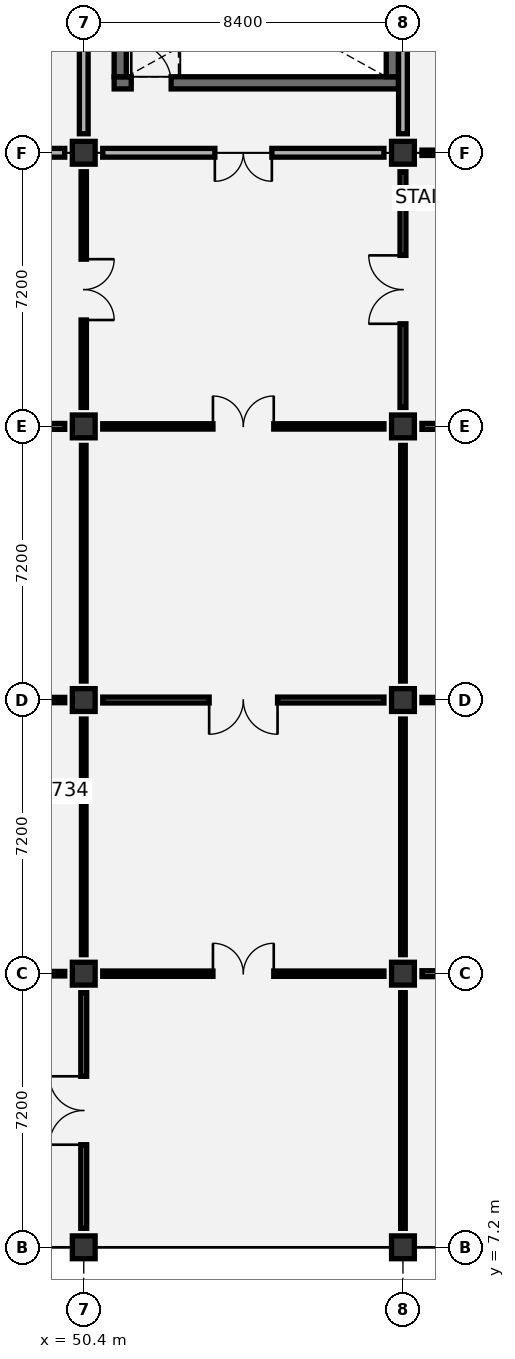
"""IFC4 building model, lengths in metres.
Left out: names, types, materials, properties, quantities, classifications, styles, units other than length and angle.
Written with IfcOpenShell. Run it as: python <this file> out.ifc"""

import sys

from ifc_helpers import new_model, si_unit, direction, frame, frame_2d, origin, origin_2d, place, context, subcontext, project, spatial, rectangle, extrude, element, fill, save


model = new_model("IFC4")
c1 = context("Model", 3, precision=1e-05, world=origin(), true_north=direction((0.0, 1.0)))
c2 = subcontext(c1, "Body", "Model", "MODEL_VIEW")
j1 = project(units=[si_unit("LENGTHUNIT", "METRE"), si_unit("PLANEANGLEUNIT", "RADIAN")], contexts=[c1])
p1 = place(None, origin())
s1 = spatial("IfcSite", under=j1, at=p1, CompositionType="ELEMENT")
p2 = place(p1, origin())
s2 = spatial("IfcBuilding", under=s1, at=p2, CompositionType="ELEMENT")
p3 = place(p2, frame((0.0, 0.0, 16.8)))
s3 = spatial("IfcBuildingStorey", under=s2, at=p3, CompositionType="ELEMENT", Elevation=16.8)
for number, where, z_axis, x_axis in (
    (1, (50.4, 7.2, 0.0), (0.0, 0.0, 1.0), (1.0, 0.0, 0.0)),
    (2, (50.4, 14.4, 0.0), (0.0, 0.0, 1.0), (1.0, 0.0, 0.0)),
    (3, (50.4, 21.6, 0.0), (0.0, 0.0, 1.0), (1.0, 0.0, 0.0)),
    (4, (50.4, 28.8, 0.0), (0.0, 0.0, 1.0), (1.0, 0.0, 0.0)),
    (5, (50.4, 36.0, 0.0), (0.0, 0.0, 1.0), (1.0, 0.0, 0.0)),
    (6, (58.8, 7.2, 0.0), (0.0, 0.0, 1.0), (1.0, 0.0, 0.0)),
    (7, (58.8, 14.4, 0.0), (0.0, 0.0, 1.0), (1.0, 0.0, 0.0)),
    (8, (58.8, 21.6, 0.0), (0.0, 0.0, 1.0), (1.0, 0.0, 0.0)),
    (9, (58.8, 28.8, 0.0), (0.0, 0.0, 1.0), (1.0, 0.0, 0.0)),
    (10, (58.8, 36.0, 0.0), (0.0, 0.0, 1.0), (1.0, 0.0, 0.0)),
):
    element("IfcColumn", number, at=place(p3, frame(where, z_axis=z_axis, x_axis=x_axis)), inside=s3, PredefinedType="COLUMN", context=c2, shape_type="SweptSolid", body=[
        extrude(rectangle(XDim=0.6, YDim=0.6, at=origin_2d()), origin(), (0.0, 0.0, 1.0), 5.05),
    ])
p4 = place(p3, frame((51.2, 37.84, 0.0), z_axis=(0.0, 0.0, 1.0), x_axis=(1.0, 0.0, 0.0)))
e11 = element("IfcWall", 11, at=p4, inside=s3, PredefinedType="SHEAR", context=c2, shape_type="SweptSolid", body=[
    extrude(rectangle(XDim=7.48, YDim=0.32, at=frame_2d((3.74, 0.0))), origin(), (0.0, 0.0, 1.0), 4.825),
])
p5 = place(p4, frame((0.45, 0.0, 0.0)))
e12 = element("IfcOpeningElement", 12, at=p5, cuts=e11, PredefinedType="OPENING", context=c2, shape_type="SweptSolid", body=[
    extrude(rectangle(XDim=1.05, YDim=2.15, at=frame_2d((0.525, 1.075))), frame((0.0, 0.17, 0.0), z_axis=(0.0, -1.0, 0.0), x_axis=(1.0, 0.0, 0.0)), (0.0, 0.0, 1.0), 0.34),
])
for number, where, z_axis, x_axis in (
    (13, (51.36, 38.0, 0.0), (0.0, 0.0, 1.0), (0.0, 1.0, 0.0)),
    (14, (58.52, 38.0, 0.0), (0.0, 0.0, 1.0), (0.0, 1.0, 0.0)),
):
    element("IfcWall", number, at=place(p3, frame(where, z_axis=z_axis, x_axis=x_axis)), inside=s3, PredefinedType="SHEAR", context=c2, shape_type="SweptSolid", body=[
        extrude(rectangle(XDim=3.8, YDim=0.32, at=frame_2d((1.9, 0.0))), origin(), (0.0, 0.0, 1.0), 4.825),
    ])
p6 = place(p3, frame((42.15, 19.2, 0.0), z_axis=(0.0, 0.0, 1.0), x_axis=(1.0, 0.0, 0.0)))
e15 = element("IfcWall", 15, at=p6, inside=s3, PredefinedType="PARTITIONING", context=c2, shape_type="SweptSolid", body=[
    extrude(rectangle(XDim=8.1, YDim=0.12, at=frame_2d((4.05, 0.0))), origin(), (0.0, 0.0, 1.0), 4.825),
])
p7 = place(p6, frame((1.08, 0.0, 0.0)))
e16 = element("IfcOpeningElement", 16, at=p7, cuts=e15, PredefinedType="OPENING", context=c2, shape_type="SweptSolid", body=[
    extrude(rectangle(XDim=0.95, YDim=2.1, at=frame_2d((0.475, 1.05))), frame((0.0, 0.07, 0.0), z_axis=(0.0, -1.0, 0.0), x_axis=(1.0, 0.0, 0.0)), (0.0, 0.0, 1.0), 0.14),
])
p8 = place(p6, frame((3.63, 0.0, 0.0)))
e17 = element("IfcOpeningElement", 17, at=p8, cuts=e15, PredefinedType="OPENING", context=c2, shape_type="SweptSolid", body=[
    extrude(rectangle(XDim=0.9, YDim=2.1, at=frame_2d((0.45, 1.05))), frame((0.0, 0.07, 0.0), z_axis=(0.0, -1.0, 0.0), x_axis=(1.0, 0.0, 0.0)), (0.0, 0.0, 1.0), 0.14),
])
p9 = place(p6, frame((6.13, 0.0, 0.0)))
e18 = element("IfcOpeningElement", 18, at=p9, cuts=e15, PredefinedType="OPENING", context=c2, shape_type="SweptSolid", body=[
    extrude(rectangle(XDim=1.0, YDim=2.1, at=frame_2d((0.5, 1.05))), frame((0.0, 0.07, 0.0), z_axis=(0.0, -1.0, 0.0), x_axis=(1.0, 0.0, 0.0)), (0.0, 0.0, 1.0), 0.14),
])
p10 = place(p3, frame((50.4, 7.7, 0.0), z_axis=(0.0, 0.0, 1.0), x_axis=(0.0, 1.0, 0.0)))
e19 = element("IfcWall", 19, at=p10, inside=s3, PredefinedType="PARTITIONING", context=c2, shape_type="SweptSolid", body=[
    extrude(rectangle(XDim=6.2, YDim=0.155, at=frame_2d((3.1, 0.0))), origin(), (0.0, 0.0, 1.0), 4.32),
])
p11 = place(p10, frame((2.2, 0.0, 0.0)))
e20 = element("IfcOpeningElement", 20, at=p11, cuts=e19, PredefinedType="OPENING", context=c2, shape_type="SweptSolid", body=[
    extrude(rectangle(XDim=1.8, YDim=2.25, at=frame_2d((0.9, 1.125))), frame((0.0, 0.087, 0.0), z_axis=(0.0, -1.0, 0.0), x_axis=(1.0, 0.0, 0.0)), (0.0, 0.0, 1.0), 0.175),
])
p12 = place(p3, frame((42.5, 14.4, 0.0), z_axis=(0.0, 0.0, 1.0), x_axis=(1.0, 0.0, 0.0)))
e21 = element("IfcWall", 21, at=p12, inside=s3, PredefinedType="PARTITIONING", context=c2, shape_type="SweptSolid", body=[
    extrude(rectangle(XDim=7.4, YDim=0.12, at=frame_2d((3.7, 0.0))), origin(), (0.0, 0.0, 1.0), 4.07),
])
p13 = place(p3, frame((50.4, 14.9, 0.0), z_axis=(0.0, 0.0, 1.0), x_axis=(0.0, 1.0, 0.0)))
e22 = element("IfcWall", 22, at=p13, inside=s3, PredefinedType="PARTITIONING", context=c2, shape_type="SweptSolid", body=[
    extrude(rectangle(XDim=6.2, YDim=0.12, at=frame_2d((3.1, 0.0))), origin(), (0.0, 0.0, 1.0), 4.12),
])
p14 = place(p3, frame((42.5, 21.6, 0.0), z_axis=(0.0, 0.0, 1.0), x_axis=(1.0, 0.0, 0.0)))
e23 = element("IfcWall", 23, at=p14, inside=s3, PredefinedType="PARTITIONING", context=c2, shape_type="SweptSolid", body=[
    extrude(rectangle(XDim=7.4, YDim=0.14, at=frame_2d((3.7, 0.0))), origin(), (0.0, 0.0, 1.0), 4.07),
])
p15 = place(p14, frame((2.9, 0.0, 0.0)))
e24 = element("IfcOpeningElement", 24, at=p15, cuts=e23, PredefinedType="OPENING", context=c2, shape_type="SweptSolid", body=[
    extrude(rectangle(XDim=1.6, YDim=2.2, at=frame_2d((0.8, 1.1))), frame((0.0, 0.08, 0.0), z_axis=(0.0, -1.0, 0.0), x_axis=(1.0, 0.0, 0.0)), (0.0, 0.0, 1.0), 0.16),
])
p16 = place(p3, frame((50.4, 22.1, 0.0), z_axis=(0.0, 0.0, 1.0), x_axis=(0.0, 1.0, 0.0)))
e25 = element("IfcWall", 25, at=p16, inside=s3, PredefinedType="PARTITIONING", context=c2, shape_type="SweptSolid", body=[
    extrude(rectangle(XDim=6.2, YDim=0.12, at=frame_2d((3.1, 0.0))), origin(), (0.0, 0.0, 1.0), 4.42),
])
p17 = place(p3, frame((42.5, 28.8, 0.0), z_axis=(0.0, 0.0, 1.0), x_axis=(1.0, 0.0, 0.0)))
e26 = element("IfcWall", 26, at=p17, inside=s3, PredefinedType="PARTITIONING", context=c2, shape_type="SweptSolid", body=[
    extrude(rectangle(XDim=7.4, YDim=0.155, at=frame_2d((3.7, 0.0))), origin(), (0.0, 0.0, 1.0), 4.07),
])
p18 = place(p17, frame((2.8, 0.0, 0.0)))
e27 = element("IfcOpeningElement", 27, at=p18, cuts=e26, PredefinedType="OPENING", context=c2, shape_type="SweptSolid", body=[
    extrude(rectangle(XDim=1.8, YDim=2.25, at=frame_2d((0.9, 1.125))), frame((0.0, 0.087, 0.0), z_axis=(0.0, -1.0, 0.0), x_axis=(1.0, 0.0, 0.0)), (0.0, 0.0, 1.0), 0.175),
])
p19 = place(p3, frame((50.4, 29.3, 0.0), z_axis=(0.0, 0.0, 1.0), x_axis=(0.0, 1.0, 0.0)))
e28 = element("IfcWall", 28, at=p19, inside=s3, PredefinedType="PARTITIONING", context=c2, shape_type="SweptSolid", body=[
    extrude(rectangle(XDim=6.2, YDim=0.14, at=frame_2d((3.1, 0.0))), origin(), (0.0, 0.0, 1.0), 4.12),
])
p20 = place(p19, frame((2.3, 0.0, 0.0)))
e29 = element("IfcOpeningElement", 29, at=p20, cuts=e28, PredefinedType="OPENING", context=c2, shape_type="SweptSolid", body=[
    extrude(rectangle(XDim=1.6, YDim=2.2, at=frame_2d((0.8, 1.1))), frame((0.0, 0.08, 0.0), z_axis=(0.0, -1.0, 0.0), x_axis=(1.0, 0.0, 0.0)), (0.0, 0.0, 1.0), 0.16),
])
p21 = place(p3, frame((42.5, 36.0, 0.0), z_axis=(0.0, 0.0, 1.0), x_axis=(1.0, 0.0, 0.0)))
e30 = element("IfcWall", 30, at=p21, inside=s3, PredefinedType="PARTITIONING", context=c2, shape_type="SweptSolid", body=[
    extrude(rectangle(XDim=7.4, YDim=0.23, at=frame_2d((3.7, 0.0))), origin(), (0.0, 0.0, 1.0), 4.07),
])
p22 = place(p21, frame((2.95, 0.0, 0.0)))
e31 = element("IfcOpeningElement", 31, at=p22, cuts=e30, PredefinedType="OPENING", context=c2, shape_type="SweptSolid", body=[
    extrude(rectangle(XDim=1.5, YDim=2.15, at=frame_2d((0.75, 1.075))), frame((0.0, 0.125, 0.0), z_axis=(0.0, -1.0, 0.0), x_axis=(1.0, 0.0, 0.0)), (0.0, 0.0, 1.0), 0.25),
])
p23 = place(p3, frame((50.4, 36.5, 0.0), z_axis=(0.0, 0.0, 1.0), x_axis=(0.0, 1.0, 0.0)))
e32 = element("IfcWall", 32, at=p23, inside=s3, PredefinedType="PARTITIONING", context=c2, shape_type="SweptSolid", body=[
    extrude(rectangle(XDim=6.2, YDim=0.23, at=frame_2d((3.1, 0.0))), origin(), (0.0, 0.0, 1.0), 4.53),
])
p24 = place(p3, frame((58.8, 7.7, 0.0), z_axis=(0.0, 0.0, 1.0), x_axis=(0.0, 1.0, 0.0)))
e33 = element("IfcWall", 33, at=p24, inside=s3, PredefinedType="PARTITIONING", context=c2, shape_type="SweptSolid", body=[
    extrude(rectangle(XDim=6.2, YDim=0.12, at=frame_2d((3.1, 0.0))), origin(), (0.0, 0.0, 1.0), 4.12),
])
p25 = place(p3, frame((50.9, 14.4, 0.0), z_axis=(0.0, 0.0, 1.0), x_axis=(1.0, 0.0, 0.0)))
e34 = element("IfcWall", 34, at=p25, inside=s3, PredefinedType="PARTITIONING", context=c2, shape_type="SweptSolid", body=[
    extrude(rectangle(XDim=7.4, YDim=0.14, at=frame_2d((3.7, 0.0))), origin(), (0.0, 0.0, 1.0), 4.07),
])
p26 = place(p25, frame((2.9, 0.0, 0.0)))
e35 = element("IfcOpeningElement", 35, at=p26, cuts=e34, PredefinedType="OPENING", context=c2, shape_type="SweptSolid", body=[
    extrude(rectangle(XDim=1.6, YDim=2.2, at=frame_2d((0.8, 1.1))), frame((0.0, 0.08, 0.0), z_axis=(0.0, -1.0, 0.0), x_axis=(1.0, 0.0, 0.0)), (0.0, 0.0, 1.0), 0.16),
])
p27 = place(p3, frame((58.8, 14.9, 0.0), z_axis=(0.0, 0.0, 1.0), x_axis=(0.0, 1.0, 0.0)))
e36 = element("IfcWall", 36, at=p27, inside=s3, PredefinedType="PARTITIONING", context=c2, shape_type="SweptSolid", body=[
    extrude(rectangle(XDim=6.2, YDim=0.12, at=frame_2d((3.1, 0.0))), origin(), (0.0, 0.0, 1.0), 4.42),
])
p28 = place(p3, frame((50.9, 21.6, 0.0), z_axis=(0.0, 0.0, 1.0), x_axis=(1.0, 0.0, 0.0)))
e37 = element("IfcWall", 37, at=p28, inside=s3, PredefinedType="PARTITIONING", context=c2, shape_type="SweptSolid", body=[
    extrude(rectangle(XDim=7.4, YDim=0.155, at=frame_2d((3.7, 0.0))), origin(), (0.0, 0.0, 1.0), 4.07),
])
p29 = place(p28, frame((2.8, 0.0, 0.0)))
e38 = element("IfcOpeningElement", 38, at=p29, cuts=e37, PredefinedType="OPENING", context=c2, shape_type="SweptSolid", body=[
    extrude(rectangle(XDim=1.8, YDim=2.25, at=frame_2d((0.9, 1.125))), frame((0.0, 0.087, 0.0), z_axis=(0.0, -1.0, 0.0), x_axis=(1.0, 0.0, 0.0)), (0.0, 0.0, 1.0), 0.175),
])
p30 = place(p3, frame((58.8, 22.1, 0.0), z_axis=(0.0, 0.0, 1.0), x_axis=(0.0, 1.0, 0.0)))
e39 = element("IfcWall", 39, at=p30, inside=s3, PredefinedType="PARTITIONING", context=c2, shape_type="SweptSolid", body=[
    extrude(rectangle(XDim=6.2, YDim=0.12, at=frame_2d((3.1, 0.0))), origin(), (0.0, 0.0, 1.0), 4.12),
])
p31 = place(p3, frame((50.9, 28.8, 0.0), z_axis=(0.0, 0.0, 1.0), x_axis=(1.0, 0.0, 0.0)))
e40 = element("IfcWall", 40, at=p31, inside=s3, PredefinedType="PARTITIONING", context=c2, shape_type="SweptSolid", body=[
    extrude(rectangle(XDim=7.4, YDim=0.14, at=frame_2d((3.7, 0.0))), origin(), (0.0, 0.0, 1.0), 4.07),
])
p32 = place(p31, frame((2.9, 0.0, 0.0)))
e41 = element("IfcOpeningElement", 41, at=p32, cuts=e40, PredefinedType="OPENING", context=c2, shape_type="SweptSolid", body=[
    extrude(rectangle(XDim=1.6, YDim=2.2, at=frame_2d((0.8, 1.1))), frame((0.0, 0.08, 0.0), z_axis=(0.0, -1.0, 0.0), x_axis=(1.0, 0.0, 0.0)), (0.0, 0.0, 1.0), 0.16),
])
p33 = place(p3, frame((58.8, 29.3, 0.0), z_axis=(0.0, 0.0, 1.0), x_axis=(0.0, 1.0, 0.0)))
e42 = element("IfcWall", 42, at=p33, inside=s3, PredefinedType="PARTITIONING", context=c2, shape_type="SweptSolid", body=[
    extrude(rectangle(XDim=6.2, YDim=0.155, at=frame_2d((3.1, 0.0))), origin(), (0.0, 0.0, 1.0), 4.53),
])
p34 = place(p33, frame((2.2, 0.0, 0.0)))
e43 = element("IfcOpeningElement", 43, at=p34, cuts=e42, PredefinedType="OPENING", context=c2, shape_type="SweptSolid", body=[
    extrude(rectangle(XDim=1.8, YDim=2.25, at=frame_2d((0.9, 1.125))), frame((0.0, 0.087, 0.0), z_axis=(0.0, -1.0, 0.0), x_axis=(1.0, 0.0, 0.0)), (0.0, 0.0, 1.0), 0.175),
])
p35 = place(p3, frame((50.9, 36.0, 0.0), z_axis=(0.0, 0.0, 1.0), x_axis=(1.0, 0.0, 0.0)))
e44 = element("IfcWall", 44, at=p35, inside=s3, PredefinedType="PARTITIONING", context=c2, shape_type="SweptSolid", body=[
    extrude(rectangle(XDim=7.4, YDim=0.23, at=frame_2d((3.7, 0.0))), origin(), (0.0, 0.0, 1.0), 4.07),
])
p36 = place(p35, frame((2.95, 0.0, 0.0)))
e45 = element("IfcOpeningElement", 45, at=p36, cuts=e44, PredefinedType="OPENING", context=c2, shape_type="SweptSolid", body=[
    extrude(rectangle(XDim=1.5, YDim=2.15, at=frame_2d((0.75, 1.075))), frame((0.0, 0.125, 0.0), z_axis=(0.0, -1.0, 0.0), x_axis=(1.0, 0.0, 0.0)), (0.0, 0.0, 1.0), 0.25),
])
p37 = place(p3, frame((58.8, 36.5, 0.0), z_axis=(0.0, 0.0, 1.0), x_axis=(0.0, 1.0, 0.0)))
e46 = element("IfcWall", 46, at=p37, inside=s3, PredefinedType="PARTITIONING", context=c2, shape_type="SweptSolid", body=[
    extrude(rectangle(XDim=6.2, YDim=0.23, at=frame_2d((3.1, 0.0))), origin(), (0.0, 0.0, 1.0), 4.12),
])
p38 = place(p3, frame((59.3, 14.4, 0.0), z_axis=(0.0, 0.0, 1.0), x_axis=(1.0, 0.0, 0.0)))
e47 = element("IfcWall", 47, at=p38, inside=s3, PredefinedType="PARTITIONING", context=c2, shape_type="SweptSolid", body=[
    extrude(rectangle(XDim=7.4, YDim=0.155, at=frame_2d((3.7, 0.0))), origin(), (0.0, 0.0, 1.0), 4.07),
])
p39 = place(p38, frame((2.8, 0.0, 0.0)))
e48 = element("IfcOpeningElement", 48, at=p39, cuts=e47, PredefinedType="OPENING", context=c2, shape_type="SweptSolid", body=[
    extrude(rectangle(XDim=1.8, YDim=2.25, at=frame_2d((0.9, 1.125))), frame((0.0, 0.087, 0.0), z_axis=(0.0, -1.0, 0.0), x_axis=(1.0, 0.0, 0.0)), (0.0, 0.0, 1.0), 0.175),
])
p40 = place(p3, frame((59.3, 21.6, 0.0), z_axis=(0.0, 0.0, 1.0), x_axis=(1.0, 0.0, 0.0)))
e49 = element("IfcWall", 49, at=p40, inside=s3, PredefinedType="PARTITIONING", context=c2, shape_type="SweptSolid", body=[
    extrude(rectangle(XDim=7.4, YDim=0.14, at=frame_2d((3.7, 0.0))), origin(), (0.0, 0.0, 1.0), 4.07),
])
p41 = place(p40, frame((2.9, 0.0, 0.0)))
e50 = element("IfcOpeningElement", 50, at=p41, cuts=e49, PredefinedType="OPENING", context=c2, shape_type="SweptSolid", body=[
    extrude(rectangle(XDim=1.6, YDim=2.2, at=frame_2d((0.8, 1.1))), frame((0.0, 0.08, 0.0), z_axis=(0.0, -1.0, 0.0), x_axis=(1.0, 0.0, 0.0)), (0.0, 0.0, 1.0), 0.16),
])
p42 = place(p3, frame((59.3, 28.8, 0.0), z_axis=(0.0, 0.0, 1.0), x_axis=(1.0, 0.0, 0.0)))
e51 = element("IfcWall", 51, at=p42, inside=s3, PredefinedType="PARTITIONING", context=c2, shape_type="SweptSolid", body=[
    extrude(rectangle(XDim=7.4, YDim=0.155, at=frame_2d((3.7, 0.0))), origin(), (0.0, 0.0, 1.0), 4.07),
])
p43 = place(p42, frame((2.8, 0.0, 0.0)))
e52 = element("IfcOpeningElement", 52, at=p43, cuts=e51, PredefinedType="OPENING", context=c2, shape_type="SweptSolid", body=[
    extrude(rectangle(XDim=1.8, YDim=2.25, at=frame_2d((0.9, 1.125))), frame((0.0, 0.087, 0.0), z_axis=(0.0, -1.0, 0.0), x_axis=(1.0, 0.0, 0.0)), (0.0, 0.0, 1.0), 0.175),
])
p44 = place(p3, frame((59.3, 36.0, 0.0), z_axis=(0.0, 0.0, 1.0), x_axis=(1.0, 0.0, 0.0)))
e53 = element("IfcWall", 53, at=p44, inside=s3, PredefinedType="PARTITIONING", context=c2, shape_type="SweptSolid", body=[
    extrude(rectangle(XDim=7.4, YDim=0.14, at=frame_2d((3.7, 0.0))), origin(), (0.0, 0.0, 1.0), 4.07),
])
p45 = place(p44, frame((2.9, 0.0, 0.0)))
e54 = element("IfcOpeningElement", 54, at=p45, cuts=e53, PredefinedType="OPENING", context=c2, shape_type="SweptSolid", body=[
    extrude(rectangle(XDim=1.6, YDim=2.2, at=frame_2d((0.8, 1.1))), frame((0.0, 0.08, 0.0), z_axis=(0.0, -1.0, 0.0), x_axis=(1.0, 0.0, 0.0)), (0.0, 0.0, 1.0), 0.16),
])
p46 = place(p5, origin())
e55 = element("IfcDoor", 55, at=p46, inside=s3, OperationType="SINGLE_SWING_LEFT", PredefinedType="DOOR", context=c2, shape_type="SweptSolid", body=[
    extrude(rectangle(XDim=1.05, YDim=2.15, at=frame_2d((0.525, 1.075))), frame((0.0, 0.025, 0.0), z_axis=(0.0, -1.0, 0.0), x_axis=(1.0, 0.0, 0.0)), (0.0, 0.0, 1.0), 0.05),
])
fill(e12, e55)
p47 = place(p11, origin())
e56 = element("IfcDoor", 56, at=p47, inside=s3, OperationType="DOUBLE_DOOR_SINGLE_SWING", PredefinedType="DOOR", context=c2, shape_type="SweptSolid", body=[
    extrude(rectangle(XDim=1.8, YDim=2.25, at=frame_2d((0.9, 1.125))), frame((0.0, 0.025, 0.0), z_axis=(0.0, -1.0, 0.0), x_axis=(1.0, 0.0, 0.0)), (0.0, 0.0, 1.0), 0.05),
])
fill(e20, e56)
p48 = place(p20, frame((1.6, 0.0, 0.0), z_axis=(0.0, 0.0, 1.0), x_axis=(-1.0, 0.0, 0.0)))
e57 = element("IfcDoor", 57, at=p48, inside=s3, OperationType="DOUBLE_DOOR_SINGLE_SWING", PredefinedType="DOOR", context=c2, shape_type="SweptSolid", body=[
    extrude(rectangle(XDim=1.6, YDim=2.2, at=frame_2d((0.8, 1.1))), frame((0.0, 0.025, 0.0), z_axis=(0.0, -1.0, 0.0), x_axis=(1.0, 0.0, 0.0)), (0.0, 0.0, 1.0), 0.05),
])
fill(e29, e57)
p49 = place(p26, origin())
e58 = element("IfcDoor", 58, at=p49, inside=s3, OperationType="DOUBLE_DOOR_SINGLE_SWING", PredefinedType="DOOR", context=c2, shape_type="SweptSolid", body=[
    extrude(rectangle(XDim=1.6, YDim=2.2, at=frame_2d((0.8, 1.1))), frame((0.0, 0.025, 0.0), z_axis=(0.0, -1.0, 0.0), x_axis=(1.0, 0.0, 0.0)), (0.0, 0.0, 1.0), 0.05),
])
fill(e35, e58)
p50 = place(p29, frame((1.8, 0.0, 0.0), z_axis=(0.0, 0.0, 1.0), x_axis=(-1.0, 0.0, 0.0)))
e59 = element("IfcDoor", 59, at=p50, inside=s3, OperationType="DOUBLE_DOOR_SINGLE_SWING", PredefinedType="DOOR", context=c2, shape_type="SweptSolid", body=[
    extrude(rectangle(XDim=1.8, YDim=2.25, at=frame_2d((0.9, 1.125))), frame((0.0, 0.025, 0.0), z_axis=(0.0, -1.0, 0.0), x_axis=(1.0, 0.0, 0.0)), (0.0, 0.0, 1.0), 0.05),
])
fill(e38, e59)
p51 = place(p32, origin())
e60 = element("IfcDoor", 60, at=p51, inside=s3, OperationType="DOUBLE_DOOR_SINGLE_SWING", PredefinedType="DOOR", context=c2, shape_type="SweptSolid", body=[
    extrude(rectangle(XDim=1.6, YDim=2.2, at=frame_2d((0.8, 1.1))), frame((0.0, 0.025, 0.0), z_axis=(0.0, -1.0, 0.0), x_axis=(1.0, 0.0, 0.0)), (0.0, 0.0, 1.0), 0.05),
])
fill(e41, e60)
p52 = place(p34, origin())
e61 = element("IfcDoor", 61, at=p52, inside=s3, OperationType="DOUBLE_DOOR_SINGLE_SWING", PredefinedType="DOOR", context=c2, shape_type="SweptSolid", body=[
    extrude(rectangle(XDim=1.8, YDim=2.25, at=frame_2d((0.9, 1.125))), frame((0.0, 0.025, 0.0), z_axis=(0.0, -1.0, 0.0), x_axis=(1.0, 0.0, 0.0)), (0.0, 0.0, 1.0), 0.05),
])
fill(e43, e61)
p53 = place(p36, frame((1.5, 0.0, 0.0), z_axis=(0.0, 0.0, 1.0), x_axis=(-1.0, 0.0, 0.0)))
e62 = element("IfcDoor", 62, at=p53, inside=s3, OperationType="DOUBLE_DOOR_SINGLE_SWING", PredefinedType="DOOR", context=c2, shape_type="SweptSolid", body=[
    extrude(rectangle(XDim=1.5, YDim=2.15, at=frame_2d((0.75, 1.075))), frame((0.0, 0.025, 0.0), z_axis=(0.0, -1.0, 0.0), x_axis=(1.0, 0.0, 0.0)), (0.0, 0.0, 1.0), 0.05),
])
fill(e45, e62)
save(model, sys.argv[1])
